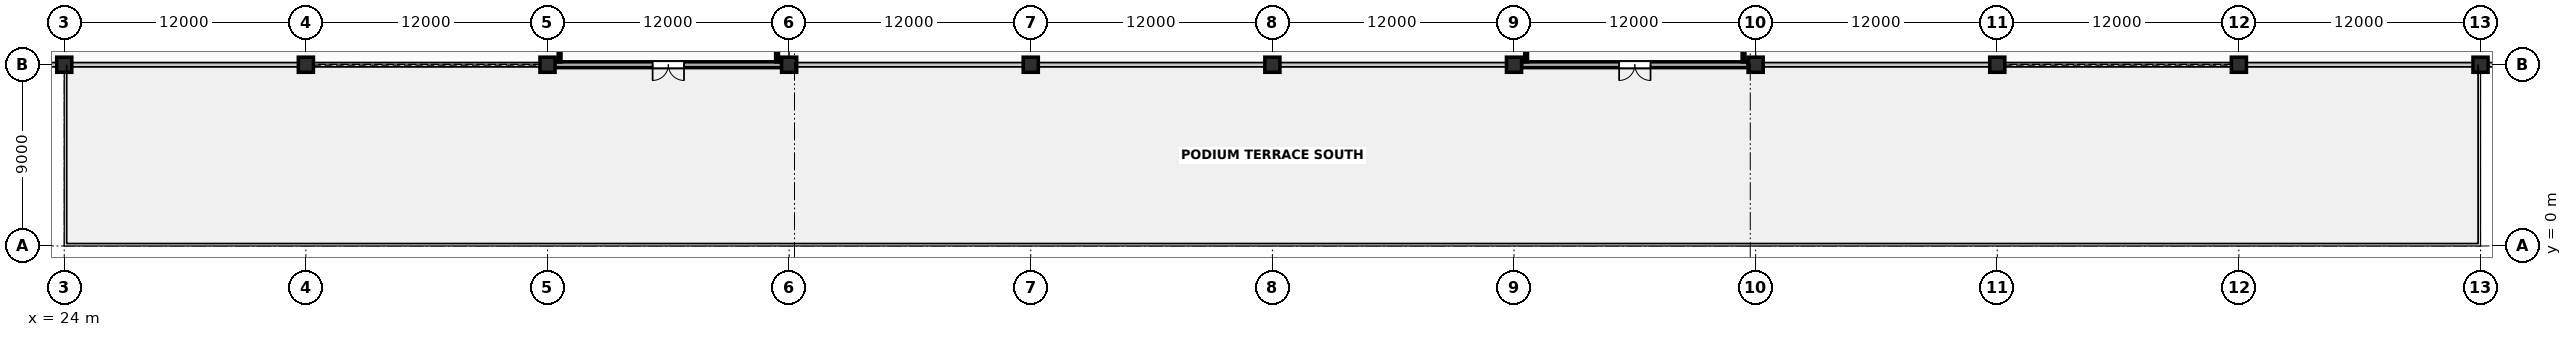
"""IFC4 building model, lengths in metres.
Left out: names, types, materials, properties, quantities, classifications, styles, units other than length and angle.
Written with IfcOpenShell. Run it as: python <this file> out.ifc"""

import sys

from ifc_helpers import new_model, si_unit, direction, frame, frame_2d, origin, origin_2d, place, context, subcontext, project, spatial, rectangle, extrude, element, fill, save


model = new_model("IFC4")
c1 = context("Model", 3, precision=1e-05, world=origin(), true_north=direction((0.0, 1.0)))
c2 = subcontext(c1, "Body", "Model", "MODEL_VIEW")
j1 = project(units=[si_unit("LENGTHUNIT", "METRE"), si_unit("PLANEANGLEUNIT", "RADIAN")], contexts=[c1])
p1 = place(None, origin())
s1 = spatial("IfcSite", under=j1, at=p1, CompositionType="ELEMENT")
p2 = place(p1, origin())
s2 = spatial("IfcBuilding", under=s1, at=p2, CompositionType="ELEMENT")
p3 = place(p2, frame((0.0, 0.0, 21.0)))
s3 = spatial("IfcBuildingStorey", under=s2, at=p3, CompositionType="ELEMENT", Elevation=21.0)
for number, where, z_axis, x_axis in (
    (1, (24.0, 9.0, 0.0), (0.0, 0.0, 1.0), (1.0, 0.0, 0.0)),
    (2, (36.0, 9.0, 0.0), (0.0, 0.0, 1.0), (1.0, 0.0, 0.0)),
    (3, (48.0, 9.0, 0.0), (0.0, 0.0, 1.0), (1.0, 0.0, 0.0)),
    (4, (60.0, 9.0, 0.0), (0.0, 0.0, 1.0), (1.0, 0.0, 0.0)),
    (5, (72.0, 9.0, 0.0), (0.0, 0.0, 1.0), (1.0, 0.0, 0.0)),
    (6, (84.0, 9.0, 0.0), (0.0, 0.0, 1.0), (1.0, 0.0, 0.0)),
    (7, (96.0, 9.0, 0.0), (0.0, 0.0, 1.0), (1.0, 0.0, 0.0)),
    (8, (108.0, 9.0, 0.0), (0.0, 0.0, 1.0), (1.0, 0.0, 0.0)),
    (9, (120.0, 9.0, 0.0), (0.0, 0.0, 1.0), (1.0, 0.0, 0.0)),
    (10, (132.0, 9.0, 0.0), (0.0, 0.0, 1.0), (1.0, 0.0, 0.0)),
    (11, (144.0, 9.0, 0.0), (0.0, 0.0, 1.0), (1.0, 0.0, 0.0)),
):
    element("IfcColumn", number, at=place(p3, frame(where, z_axis=z_axis, x_axis=x_axis)), inside=s3, PredefinedType="COLUMN", context=c2, shape_type="SweptSolid", body=[
        extrude(rectangle(XDim=0.75, YDim=0.75, at=origin_2d()), origin(), (0.0, 0.0, 1.0), 3.8),
    ])
for number, where, z_axis, x_axis in (
    (12, (12.373, 9.0, 0.0), (0.0, 0.0, 1.0), (1.0, 0.0, 0.0)),
    (13, (24.373, 9.0, 0.0), (0.0, 0.0, 1.0), (1.0, 0.0, 0.0)),
    (14, (36.373, 9.0, 0.0), (0.0, 0.0, 1.0), (1.0, 0.0, 0.0)),
):
    element("IfcWall", number, at=place(p3, frame(where, z_axis=z_axis, x_axis=x_axis)), inside=s3, PredefinedType="PARAPET", context=c2, shape_type="SweptSolid", body=[
        extrude(rectangle(XDim=11.254, YDim=0.215, at=frame_2d((5.627, 0.0))), origin(), (0.0, 0.0, 1.0), 1.15),
    ])
p4 = place(p3, frame((48.373, 9.0, 0.0), z_axis=(0.0, 0.0, 1.0), x_axis=(1.0, 0.0, 0.0)))
e15 = element("IfcWall", 15, at=p4, inside=s3, PredefinedType="SOLIDWALL", context=c2, shape_type="SweptSolid", body=[
    extrude(rectangle(XDim=11.254, YDim=0.29, at=frame_2d((5.627, 0.0))), origin(), (0.0, 0.0, 1.0), 2.385),
])
p5 = place(p4, frame((4.847, 0.0, 0.0)))
e16 = element("IfcOpeningElement", 16, at=p5, cuts=e15, PredefinedType="OPENING", context=c2, shape_type="SweptSolid", body=[
    extrude(rectangle(XDim=1.56, YDim=2.3, at=frame_2d((0.78, 1.15))), frame((0.0, 0.16, 0.0), z_axis=(0.0, -1.0, 0.0), x_axis=(1.0, 0.0, 0.0)), (0.0, 0.0, 1.0), 0.32),
])
for number, where, z_axis, x_axis in (
    (17, (60.373, 9.0, 0.0), (0.0, 0.0, 1.0), (1.0, 0.0, 0.0)),
    (18, (72.373, 9.0, 0.0), (0.0, 0.0, 1.0), (1.0, 0.0, 0.0)),
    (19, (84.373, 9.0, 0.0), (0.0, 0.0, 1.0), (1.0, 0.0, 0.0)),
):
    element("IfcWall", number, at=place(p3, frame(where, z_axis=z_axis, x_axis=x_axis)), inside=s3, PredefinedType="PARAPET", context=c2, shape_type="SweptSolid", body=[
        extrude(rectangle(XDim=11.254, YDim=0.215, at=frame_2d((5.627, 0.0))), origin(), (0.0, 0.0, 1.0), 1.15),
    ])
p6 = place(p3, frame((96.373, 9.0, 0.0), z_axis=(0.0, 0.0, 1.0), x_axis=(1.0, 0.0, 0.0)))
e20 = element("IfcWall", 20, at=p6, inside=s3, PredefinedType="SOLIDWALL", context=c2, shape_type="SweptSolid", body=[
    extrude(rectangle(XDim=11.254, YDim=0.29, at=frame_2d((5.627, 0.0))), origin(), (0.0, 0.0, 1.0), 2.385),
])
p7 = place(p6, frame((4.847, 0.0, 0.0)))
e21 = element("IfcOpeningElement", 21, at=p7, cuts=e20, PredefinedType="OPENING", context=c2, shape_type="SweptSolid", body=[
    extrude(rectangle(XDim=1.56, YDim=2.3, at=frame_2d((0.78, 1.15))), frame((0.0, 0.16, 0.0), z_axis=(0.0, -1.0, 0.0), x_axis=(1.0, 0.0, 0.0)), (0.0, 0.0, 1.0), 0.32),
])
for number, where, z_axis, x_axis in (
    (22, (108.373, 9.0, 0.0), (0.0, 0.0, 1.0), (1.0, 0.0, 0.0)),
    (23, (120.373, 9.0, 0.0), (0.0, 0.0, 1.0), (1.0, 0.0, 0.0)),
    (24, (132.373, 9.0, 0.0), (0.0, 0.0, 1.0), (1.0, 0.0, 0.0)),
    (25, (144.373, 9.0, 0.0), (0.0, 0.0, 1.0), (1.0, 0.0, 0.0)),
):
    element("IfcWall", number, at=place(p3, frame(where, z_axis=z_axis, x_axis=x_axis)), inside=s3, PredefinedType="PARAPET", context=c2, shape_type="SweptSolid", body=[
        extrude(rectangle(XDim=11.254, YDim=0.215, at=frame_2d((5.627, 0.0))), origin(), (0.0, 0.0, 1.0), 1.15),
    ])
for number, where, z_axis, x_axis in (
    (26, (48.6, 9.14, 0.0), (0.0, 0.0, 1.0), (0.0, 1.0, 0.0)),
    (27, (59.4, 9.14, 0.0), (0.0, 0.0, 1.0), (0.0, 1.0, 0.0)),
    (28, (96.6, 9.14, 0.0), (0.0, 0.0, 1.0), (0.0, 1.0, 0.0)),
    (29, (107.4, 9.14, 0.0), (0.0, 0.0, 1.0), (0.0, 1.0, 0.0)),
):
    element("IfcWall", number, at=place(p3, frame(where, z_axis=z_axis, x_axis=x_axis)), inside=s3, PredefinedType="PARTITIONING", context=c2, shape_type="SweptSolid", body=[
        extrude(rectangle(XDim=11.7, YDim=0.14, at=frame_2d((5.85, 0.0))), origin(), (0.0, 0.0, 1.0), 2.75),
    ])
p8 = place(p5, origin())
e30 = element("IfcDoor", 30, at=p8, inside=s3, OperationType="DOUBLE_DOOR_SINGLE_SWING", PredefinedType="DOOR", context=c2, shape_type="SweptSolid", body=[
    extrude(rectangle(XDim=1.56, YDim=2.3, at=frame_2d((0.78, 1.15))), frame((0.0, 0.025, 0.0), z_axis=(0.0, -1.0, 0.0), x_axis=(1.0, 0.0, 0.0)), (0.0, 0.0, 1.0), 0.05),
])
fill(e16, e30)
p9 = place(p7, origin())
e31 = element("IfcDoor", 31, at=p9, inside=s3, OperationType="DOUBLE_DOOR_SINGLE_SWING", PredefinedType="DOOR", context=c2, shape_type="SweptSolid", body=[
    extrude(rectangle(XDim=1.56, YDim=2.3, at=frame_2d((0.78, 1.15))), frame((0.0, 0.025, 0.0), z_axis=(0.0, -1.0, 0.0), x_axis=(1.0, 0.0, 0.0)), (0.0, 0.0, 1.0), 0.05),
])
fill(e21, e31)
save(model, sys.argv[1])
